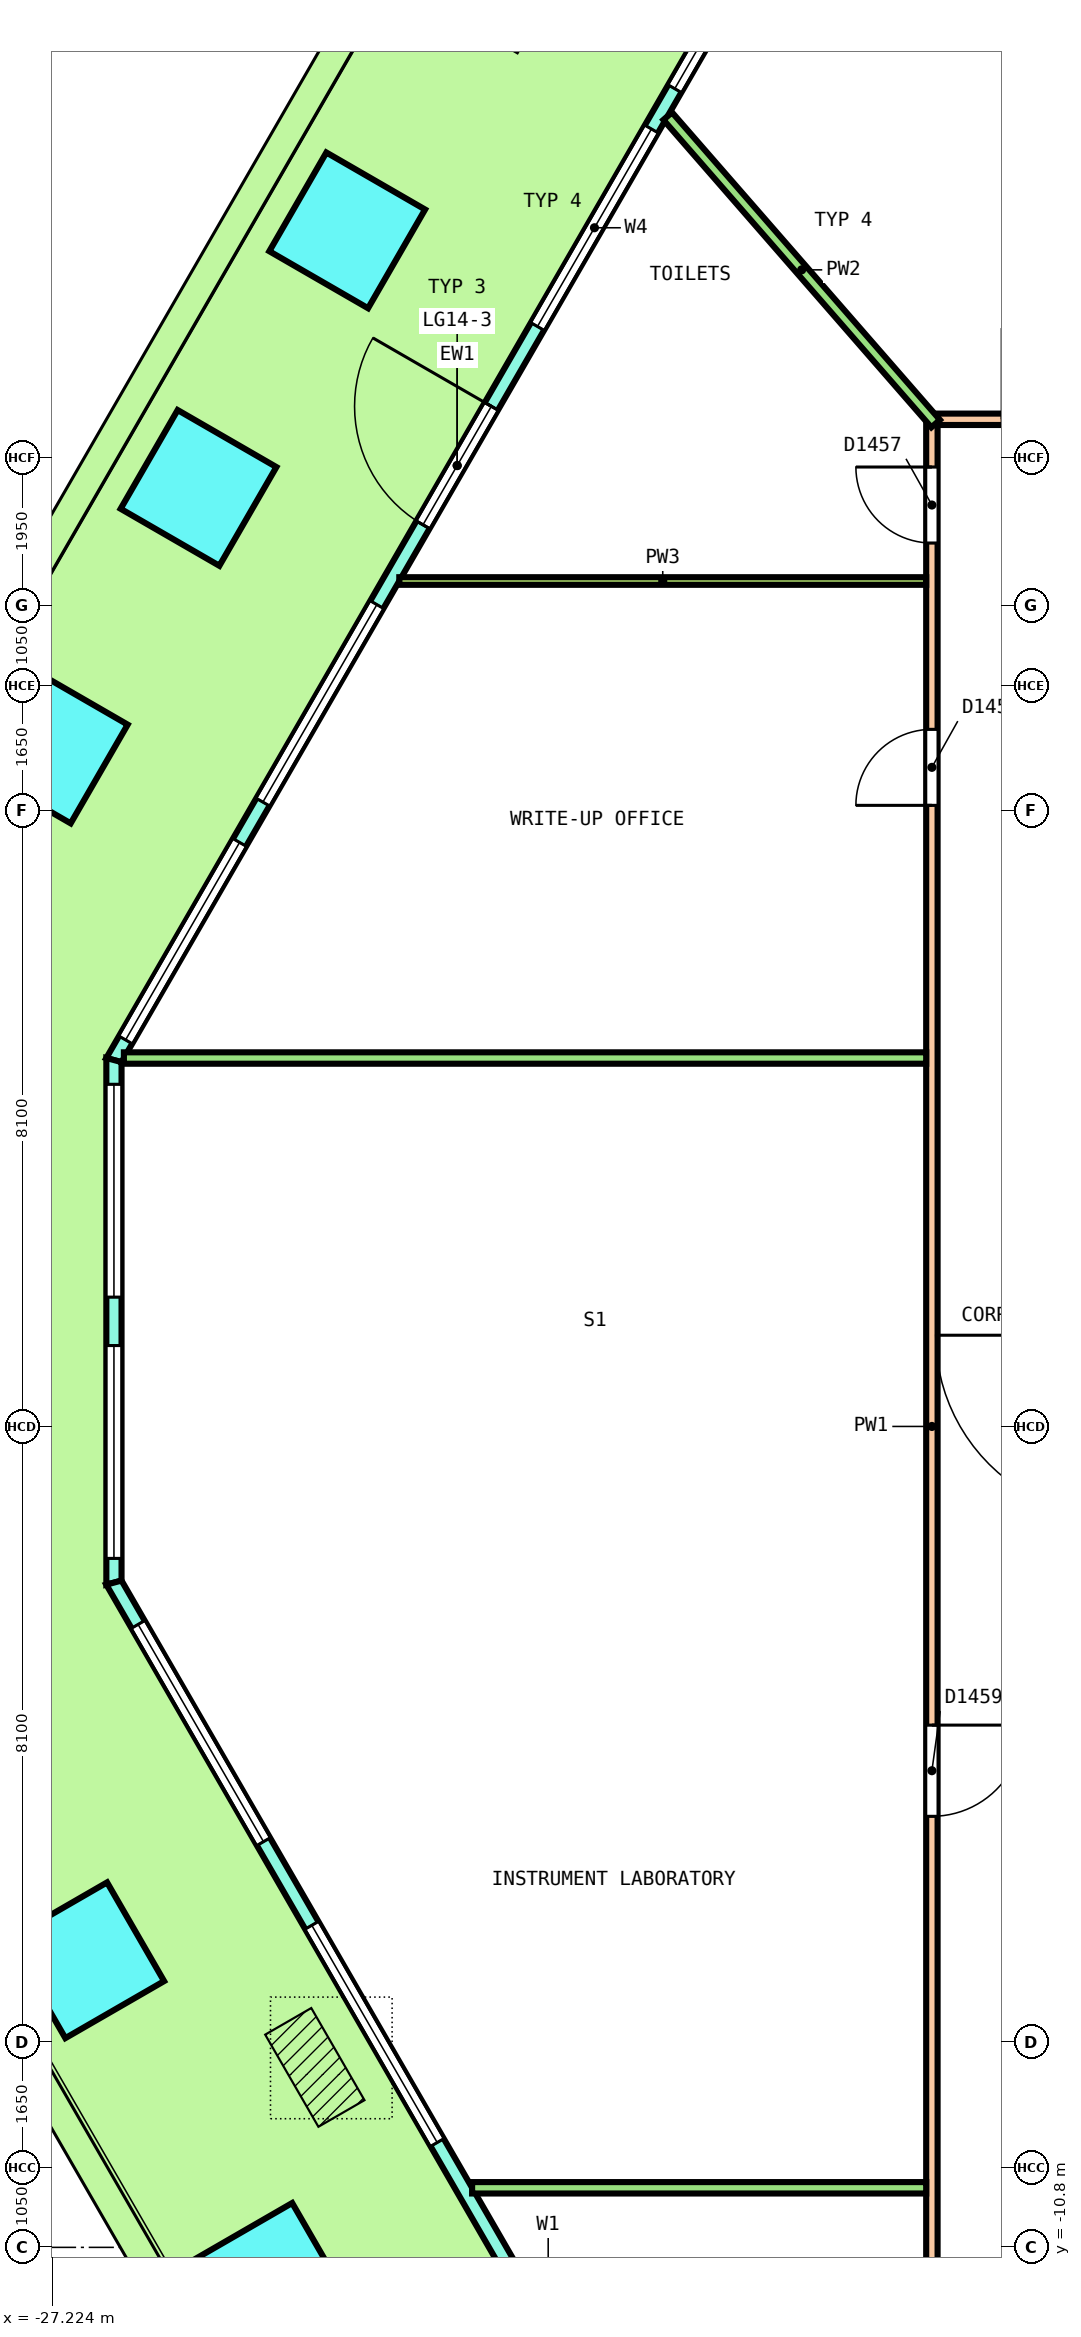
"""IFC4 building model, lengths in metres.
Left out: names, types, materials, properties, quantities, classifications, styles, units other than length and angle.
Written with IfcOpenShell. Run it as: python <this file> out.ifc"""

import sys

from ifc_helpers import new_model, si_unit, direction, frame, frame_2d, origin, origin_2d, place, context, subcontext, project, spatial, polyline, rectangle, outline, extrude, element, fill, save


model = new_model("IFC4")
c1 = context("Model", 3, precision=1e-05, world=origin(), true_north=direction((0.0, 1.0)))
c2 = subcontext(c1, "Body", "Model", "MODEL_VIEW")
j1 = project(units=[si_unit("LENGTHUNIT", "METRE"), si_unit("PLANEANGLEUNIT", "RADIAN")], contexts=[c1])
p1 = place(None, origin())
s1 = spatial("IfcSite", under=j1, at=p1, CompositionType="ELEMENT")
p2 = place(p1, origin())
s2 = spatial("IfcBuilding", under=s1, at=p2, CompositionType="ELEMENT")
p3 = place(p2, frame((0.0, 0.0, 63.0)))
s3 = spatial("IfcBuildingStorey", under=s2, at=p3, CompositionType="ELEMENT", Elevation=63.0)
for number, where, z_axis, x_axis in (
    (1, (-23.342, 15.736, 0.0), (0.0, 0.0, 1.0), (-0.5, -0.866, 0.0)),
    (2, (-25.299, 12.347, 0.0), (0.0, 0.0, 1.0), (-0.5, -0.866, 0.0)),
    (3, (-27.255, 8.959, 0.0), (0.0, 0.0, 1.0), (-0.5, -0.866, 0.0)),
    (4, (-26.776, -7.023, 0.0), (0.0, 0.0, 1.0), (0.5, -0.866, 0.0)),
):
    element("IfcColumn", number, at=place(p3, frame(where, z_axis=z_axis, x_axis=x_axis)), inside=s3, PredefinedType="COLUMN", context=c2, shape_type="SweptSolid", body=[
        extrude(rectangle(XDim=1.5, YDim=1.5, at=origin_2d()), origin(), (0.0, 0.0, 1.0), 4.04),
    ])
p4 = place(p3, frame((-24.341, -11.241, 0.0), z_axis=(0.0, 0.0, 1.0), x_axis=(0.5, -0.866025403784, 0.0)))
e5 = element("IfcColumn", 5, at=p4, inside=s3, PredefinedType="COLUMN", context=c2, shape_type="SweptSolid", body=[
    extrude(rectangle(XDim=1.5, YDim=1.5, at=origin_2d()), origin(), (0.0, 0.0, 1.0), 4.05),
])
p5 = place(p3, frame((-17.38, 20.463, 0.0), z_axis=(0.0, 0.0, 1.0), x_axis=(-0.500000137386, -0.866025324465, 0.0)))
e6 = element("IfcWall", 6, at=p5, inside=s3, PredefinedType="SOLIDWALL", context=c2, shape_type="SweptSolid", body=[
    extrude(outline(polyline([(-0.027, -0.1), (0.979, -0.1), (1.986, -0.1), (2.992, -0.1), (3.999, -0.1), (5.005, -0.1), (6.012, -0.1), (7.018, -0.1), (8.025, -0.1), (9.031, -0.1), (10.038, -0.1), (11.044, -0.1), (12.051, -0.1), (13.057, -0.1), (14.063, -0.1), (15.07, -0.1), (16.076, -0.1), (17.083, -0.1), (18.089, -0.1), (18.036, 0.1), (17.035, 0.1), (16.035, 0.1), (15.034, 0.1), (14.034, 0.1), (13.033, 0.1), (12.033, 0.1), (11.032, 0.1), (10.032, 0.1), (9.031, 0.1), (8.031, 0.1), (7.03, 0.1), (6.03, 0.1), (5.029, 0.1), (4.029, 0.1), (3.028, 0.1), (2.028, 0.1), (1.027, 0.1), (0.027, 0.1), (-0.027, -0.1)])), origin(), (0.0, 0.0, 1.0), 4.1),
])
p6 = place(p5, frame((0.306, 0.0, 0.1)))
e7 = element("IfcOpeningElement", 7, at=p6, cuts=e6, PredefinedType="OPENING", context=c2, shape_type="SweptSolid", body=[
    extrude(rectangle(XDim=3.0, YDim=2.9, at=frame_2d((1.5, 1.45))), frame((0.0, 0.11, 0.0), z_axis=(0.0, -1.0, 0.0), x_axis=(1.0, 0.0, 0.0)), (0.0, 0.0, 1.0), 0.22),
])
p7 = place(p5, frame((3.919, 0.0, 0.1)))
e8 = element("IfcOpeningElement", 8, at=p7, cuts=e6, PredefinedType="OPENING", context=c2, shape_type="SweptSolid", body=[
    extrude(rectangle(XDim=3.0, YDim=2.9, at=frame_2d((1.5, 1.45))), frame((0.0, 0.11, 0.0), z_axis=(0.0, -1.0, 0.0), x_axis=(1.0, 0.0, 0.0)), (0.0, 0.0, 1.0), 0.22),
])
p8 = place(p5, frame((8.131, 0.0, 0.0)))
e9 = element("IfcOpeningElement", 9, at=p8, cuts=e6, PredefinedType="OPENING", context=c2, shape_type="SweptSolid", body=[
    extrude(rectangle(XDim=1.8, YDim=2.4, at=frame_2d((0.9, 1.2))), frame((0.0, 0.11, 0.0), z_axis=(0.0, -1.0, 0.0), x_axis=(1.0, 0.0, 0.0)), (0.0, 0.0, 1.0), 0.22),
])
p9 = place(p5, frame((8.131, 0.0, 2.55)))
e10 = element("IfcOpeningElement", 10, at=p9, cuts=e6, PredefinedType="OPENING", context=c2, shape_type="SweptSolid", body=[
    extrude(rectangle(XDim=1.8, YDim=0.45, at=frame_2d((0.9, 0.225))), frame((0.0, 0.11, 0.0), z_axis=(0.0, -1.0, 0.0), x_axis=(1.0, 0.0, 0.0)), (0.0, 0.0, 1.0), 0.22),
])
p10 = place(p5, frame((11.144, 0.0, 0.1)))
e11 = element("IfcOpeningElement", 11, at=p10, cuts=e6, PredefinedType="OPENING", context=c2, shape_type="SweptSolid", body=[
    extrude(rectangle(XDim=3.0, YDim=2.9, at=frame_2d((1.5, 1.45))), frame((0.0, 0.11, 0.0), z_axis=(0.0, -1.0, 0.0), x_axis=(1.0, 0.0, 0.0)), (0.0, 0.0, 1.0), 0.22),
])
p11 = place(p5, frame((14.756, 0.0, 0.1)))
e12 = element("IfcOpeningElement", 12, at=p11, cuts=e6, PredefinedType="OPENING", context=c2, shape_type="SweptSolid", body=[
    extrude(rectangle(XDim=3.0, YDim=2.9, at=frame_2d((1.5, 1.45))), frame((0.0, 0.11, 0.0), z_axis=(0.0, -1.0, 0.0), x_axis=(1.0, 0.0, 0.0)), (0.0, 0.0, 1.0), 0.22),
])
p12 = place(p3, frame((-26.411, 4.82, 0.0), z_axis=(0.0, 0.0, 1.0), x_axis=(0.0, -1.0, 0.0)))
e13 = element("IfcWall", 13, at=p12, inside=s3, PredefinedType="SOLIDWALL", context=c2, shape_type="SweptSolid", body=[
    extrude(outline(polyline([(-0.027, -0.1), (1.128, -0.1), (2.283, -0.1), (3.438, -0.1), (4.592, -0.1), (5.747, -0.1), (6.902, -0.1), (6.848, 0.1), (5.711, 0.1), (4.574, 0.1), (3.438, 0.1), (2.301, 0.1), (1.164, 0.1), (0.027, 0.1), (-0.027, -0.1)])), origin(), (0.0, 0.0, 1.0), 4.1),
])
p13 = place(p12, frame((0.319, 0.0, 0.1)))
e14 = element("IfcOpeningElement", 14, at=p13, cuts=e13, PredefinedType="OPENING", context=c2, shape_type="SweptSolid", body=[
    extrude(rectangle(XDim=2.8, YDim=2.9, at=frame_2d((1.4, 1.45))), frame((0.0, 0.11, 0.0), z_axis=(0.0, -1.0, 0.0), x_axis=(1.0, 0.0, 0.0)), (0.0, 0.0, 1.0), 0.22),
])
p14 = place(p12, frame((3.756, 0.0, 0.1)))
e15 = element("IfcOpeningElement", 15, at=p14, cuts=e13, PredefinedType="OPENING", context=c2, shape_type="SweptSolid", body=[
    extrude(rectangle(XDim=2.8, YDim=2.9, at=frame_2d((1.4, 1.45))), frame((0.0, 0.11, 0.0), z_axis=(0.0, -1.0, 0.0), x_axis=(1.0, 0.0, 0.0)), (0.0, 0.0, 1.0), 0.22),
])
p15 = place(p3, frame((-26.411, -2.055, 0.0), z_axis=(0.0, 0.0, 1.0), x_axis=(0.50000204422, -0.86602422355, 0.0)))
e16 = element("IfcWall", 16, at=p15, inside=s3, PredefinedType="SOLIDWALL", context=c2, shape_type="SweptSolid", body=[
    extrude(outline(polyline([(-0.027, -0.1), (1.014, -0.1), (2.055, -0.1), (3.097, -0.1), (4.138, -0.1), (5.179, -0.1), (6.22, -0.1), (7.261, -0.1), (8.303, -0.1), (9.344, -0.1), (10.385, -0.1), (11.426, -0.1), (12.468, -0.1), (13.509, -0.1), (14.55, -0.1), (15.591, -0.1), (16.632, -0.1), (17.673, -0.1), (18.715, -0.1), (19.756, -0.1), (20.797, -0.1), (21.838, -0.1), (22.879, -0.1), (22.826, 0.1), (21.789, 0.1), (20.753, 0.1), (19.717, 0.1), (18.68, 0.1), (17.644, 0.1), (16.608, 0.1), (15.572, 0.1), (14.535, 0.1), (13.499, 0.1), (12.463, 0.1), (11.426, 0.1), (10.39, 0.1), (9.354, 0.1), (8.317, 0.1), (7.281, 0.1), (6.245, 0.1), (5.208, 0.1), (4.172, 0.1), (3.136, 0.1), (2.099, 0.1), (1.063, 0.1), (0.027, 0.1), (-0.027, -0.1)])), origin(), (0.0, 0.0, 1.0), 4.1),
])
p16 = place(p15, frame((0.635, 0.0, 0.1)))
e17 = element("IfcOpeningElement", 17, at=p16, cuts=e16, PredefinedType="OPENING", context=c2, shape_type="SweptSolid", body=[
    extrude(rectangle(XDim=3.3, YDim=2.9, at=frame_2d((1.65, 1.45))), frame((0.0, 0.11, 0.0), z_axis=(0.0, -1.0, 0.0), x_axis=(1.0, 0.0, 0.0)), (0.0, 0.0, 1.0), 0.22),
])
p17 = place(p15, frame((5.206, 0.0, 0.1)))
e18 = element("IfcOpeningElement", 18, at=p17, cuts=e16, PredefinedType="OPENING", context=c2, shape_type="SweptSolid", body=[
    extrude(rectangle(XDim=3.3, YDim=2.9, at=frame_2d((1.65, 1.45))), frame((0.0, 0.11, 0.0), z_axis=(0.0, -1.0, 0.0), x_axis=(1.0, 0.0, 0.0)), (0.0, 0.0, 1.0), 0.22),
])
p18 = place(p15, frame((10.526, 0.0, 0.0)))
e19 = element("IfcOpeningElement", 19, at=p18, cuts=e16, PredefinedType="OPENING", context=c2, shape_type="SweptSolid", body=[
    extrude(rectangle(XDim=1.8, YDim=2.4, at=frame_2d((0.9, 1.2))), frame((0.0, 0.11, 0.0), z_axis=(0.0, -1.0, 0.0), x_axis=(1.0, 0.0, 0.0)), (0.0, 0.0, 1.0), 0.22),
])
p19 = place(p15, frame((10.526, 0.0, 2.55)))
e20 = element("IfcOpeningElement", 20, at=p19, cuts=e16, PredefinedType="OPENING", context=c2, shape_type="SweptSolid", body=[
    extrude(rectangle(XDim=1.8, YDim=0.45, at=frame_2d((0.9, 0.225))), frame((0.0, 0.11, 0.0), z_axis=(0.0, -1.0, 0.0), x_axis=(1.0, 0.0, 0.0)), (0.0, 0.0, 1.0), 0.22),
])
p20 = place(p15, frame((14.347, 0.0, 0.1)))
e21 = element("IfcOpeningElement", 21, at=p20, cuts=e16, PredefinedType="OPENING", context=c2, shape_type="SweptSolid", body=[
    extrude(rectangle(XDim=3.3, YDim=2.9, at=frame_2d((1.65, 1.45))), frame((0.0, 0.11, 0.0), z_axis=(0.0, -1.0, 0.0), x_axis=(1.0, 0.0, 0.0)), (0.0, 0.0, 1.0), 0.22),
])
p21 = place(p15, frame((18.917, 0.0, 0.1)))
e22 = element("IfcOpeningElement", 22, at=p21, cuts=e16, PredefinedType="OPENING", context=c2, shape_type="SweptSolid", body=[
    extrude(rectangle(XDim=3.3, YDim=2.9, at=frame_2d((1.65, 1.45))), frame((0.0, 0.11, 0.0), z_axis=(0.0, -1.0, 0.0), x_axis=(1.0, 0.0, 0.0)), (0.0, 0.0, 1.0), 0.22),
])
p22 = place(p3, frame((-15.575, 13.25, 0.0), z_axis=(0.0, 0.0, 1.0), x_axis=(1.0, 0.0, 0.0)))
e23 = element("IfcWall", 23, at=p22, inside=s3, PredefinedType="PARTITIONING", context=c2, shape_type="SweptSolid", body=[
    extrude(rectangle(XDim=31.175, YDim=0.15, at=frame_2d((15.587, 0.0))), origin(), (0.0, 0.0, 1.0), 3.05),
])
p23 = place(p22, frame((28.252, 0.0, 0.0)))
e24 = element("IfcOpeningElement", 24, at=p23, cuts=e23, PredefinedType="OPENING", context=c2, shape_type="SweptSolid", body=[
    extrude(rectangle(XDim=1.0, YDim=2.1, at=frame_2d((0.5, 1.05))), frame((0.0, 0.085, 0.0), z_axis=(0.0, -1.0, 0.0), x_axis=(1.0, 0.0, 0.0)), (0.0, 0.0, 1.0), 0.17),
])
p24 = place(p22, frame((14.802, 0.0, 0.0)))
e25 = element("IfcOpeningElement", 25, at=p24, cuts=e23, PredefinedType="OPENING", context=c2, shape_type="SweptSolid", body=[
    extrude(rectangle(XDim=1.2, YDim=2.1, at=frame_2d((0.6, 1.05))), frame((0.0, 0.085, 0.0), z_axis=(0.0, -1.0, 0.0), x_axis=(1.0, 0.0, 0.0)), (0.0, 0.0, 1.0), 0.17),
])
p25 = place(p22, frame((5.812, 0.0, 0.0)))
e26 = element("IfcOpeningElement", 26, at=p25, cuts=e23, PredefinedType="OPENING", context=c2, shape_type="SweptSolid", body=[
    extrude(rectangle(XDim=1.2, YDim=2.1, at=frame_2d((0.6, 1.05))), frame((0.0, 0.085, 0.0), z_axis=(0.0, -1.0, 0.0), x_axis=(1.0, 0.0, 0.0)), (0.0, 0.0, 1.0), 0.17),
])
p26 = place(p22, frame((0.849, 0.0, 0.0)))
e27 = element("IfcOpeningElement", 27, at=p26, cuts=e23, PredefinedType="OPENING", context=c2, shape_type="SweptSolid", body=[
    extrude(rectangle(XDim=1.2, YDim=2.1, at=frame_2d((0.6, 1.05))), frame((0.0, 0.085, 0.0), z_axis=(0.0, -1.0, 0.0), x_axis=(1.0, 0.0, 0.0)), (0.0, 0.0, 1.0), 0.17),
])
p27 = place(p3, frame((-15.65, -13.175, 0.0), z_axis=(0.0, 0.0, 1.0), x_axis=(0.0, 1.0, 0.0)))
e28 = element("IfcWall", 28, at=p27, inside=s3, PredefinedType="PARTITIONING", context=c2, shape_type="SweptSolid", body=[
    extrude(rectangle(XDim=26.35, YDim=0.15, at=frame_2d((13.175, 0.0))), origin(), (0.0, 0.0, 1.0), 3.05),
])
p28 = place(p27, frame((24.797, 0.0, 0.0)))
e29 = element("IfcOpeningElement", 29, at=p28, cuts=e28, PredefinedType="OPENING", context=c2, shape_type="SweptSolid", body=[
    extrude(rectangle(XDim=1.0, YDim=2.1, at=frame_2d((0.5, 1.05))), frame((0.0, 0.085, 0.0), z_axis=(0.0, -1.0, 0.0), x_axis=(1.0, 0.0, 0.0)), (0.0, 0.0, 1.0), 0.17),
])
p29 = place(p27, frame((21.346, 0.0, 0.0)))
e30 = element("IfcOpeningElement", 30, at=p29, cuts=e28, PredefinedType="OPENING", context=c2, shape_type="SweptSolid", body=[
    extrude(rectangle(XDim=1.0, YDim=2.1, at=frame_2d((0.5, 1.05))), frame((0.0, 0.085, 0.0), z_axis=(0.0, -1.0, 0.0), x_axis=(1.0, 0.0, 0.0)), (0.0, 0.0, 1.0), 0.17),
])
p30 = place(p27, frame((8.046, 0.0, 0.0)))
e31 = element("IfcOpeningElement", 31, at=p30, cuts=e28, PredefinedType="OPENING", context=c2, shape_type="SweptSolid", body=[
    extrude(rectangle(XDim=1.2, YDim=2.1, at=frame_2d((0.6, 1.05))), frame((0.0, 0.085, 0.0), z_axis=(0.0, -1.0, 0.0), x_axis=(1.0, 0.0, 0.0)), (0.0, 0.0, 1.0), 0.17),
])
p31 = place(p3, frame((-19.126, 17.239, 0.0), z_axis=(0.0, 0.0, 1.0), x_axis=(0.65698603945, -0.753902741717, 0.0)))
e32 = element("IfcWall", 32, at=p31, inside=s3, PredefinedType="PARTITIONING", context=c2, shape_type="SweptSolid", body=[
    extrude(rectangle(XDim=5.366, YDim=0.15, at=frame_2d((2.683, 0.0))), origin(), (0.0, 0.0, 1.0), 3.05),
])
p32 = place(p3, frame((-26.28, 4.847, 0.0), z_axis=(0.0, 0.0, 1.0), x_axis=(1.0, 0.0, 0.0)))
e33 = element("IfcWall", 33, at=p32, inside=s3, PredefinedType="PARTITIONING", context=c2, shape_type="SweptSolid", body=[
    extrude(rectangle(XDim=10.555, YDim=0.15, at=frame_2d((5.278, 0.0))), origin(), (0.0, 0.0, 1.0), 3.05),
])
p33 = place(p3, frame((-21.699, -10.016, 0.0), z_axis=(0.0, 0.0, 1.0), x_axis=(1.0, 0.0, 0.0)))
e34 = element("IfcWall", 34, at=p33, inside=s3, PredefinedType="PARTITIONING", context=c2, shape_type="SweptSolid", body=[
    extrude(rectangle(XDim=5.974, YDim=0.15, at=frame_2d((2.987, 0.0))), origin(), (0.0, 0.0, 1.0), 3.05),
])
p34 = place(p3, frame((-22.657, 11.123, 0.0), z_axis=(0.0, 0.0, 1.0), x_axis=(1.0, 0.0, 0.0)))
e35 = element("IfcWall", 35, at=p34, inside=s3, PredefinedType="PARTITIONING", context=c2, shape_type="SweptSolid", body=[
    extrude(rectangle(XDim=6.932, YDim=0.1, at=frame_2d((3.466, 0.0))), origin(), (0.0, 0.0, 1.0), 3.05),
])
p35 = place(p6, origin())
e36 = element("IfcWindow", 36, at=p35, inside=s3, PartitioningType="SINGLE_PANEL", PredefinedType="WINDOW", context=c2, shape_type="SweptSolid", body=[
    extrude(rectangle(XDim=3.0, YDim=2.9, at=frame_2d((1.5, 1.45))), frame((0.0, 0.03, 0.0), z_axis=(0.0, -1.0, 0.0), x_axis=(1.0, 0.0, 0.0)), (0.0, 0.0, 1.0), 0.06),
])
fill(e7, e36)
p36 = place(p7, origin())
e37 = element("IfcWindow", 37, at=p36, inside=s3, PartitioningType="SINGLE_PANEL", PredefinedType="WINDOW", context=c2, shape_type="SweptSolid", body=[
    extrude(rectangle(XDim=3.0, YDim=2.9, at=frame_2d((1.5, 1.45))), frame((0.0, 0.03, 0.0), z_axis=(0.0, -1.0, 0.0), x_axis=(1.0, 0.0, 0.0)), (0.0, 0.0, 1.0), 0.06),
])
fill(e8, e37)
p37 = place(p8, origin())
e38 = element("IfcDoor", 38, at=p37, inside=s3, OperationType="DOUBLE_DOOR_SINGLE_SWING", PredefinedType="DOOR", context=c2, shape_type="SweptSolid", body=[
    extrude(rectangle(XDim=1.8, YDim=2.4, at=frame_2d((0.9, 1.2))), frame((0.0, 0.025, 0.0), z_axis=(0.0, -1.0, 0.0), x_axis=(1.0, 0.0, 0.0)), (0.0, 0.0, 1.0), 0.05),
])
fill(e9, e38)
p38 = place(p9, origin())
e39 = element("IfcWindow", 39, at=p38, inside=s3, PartitioningType="SINGLE_PANEL", PredefinedType="WINDOW", context=c2, shape_type="SweptSolid", body=[
    extrude(rectangle(XDim=1.8, YDim=0.45, at=frame_2d((0.9, 0.225))), frame((0.0, 0.03, 0.0), z_axis=(0.0, -1.0, 0.0), x_axis=(1.0, 0.0, 0.0)), (0.0, 0.0, 1.0), 0.06),
])
fill(e10, e39)
p39 = place(p10, origin())
e40 = element("IfcWindow", 40, at=p39, inside=s3, PartitioningType="SINGLE_PANEL", PredefinedType="WINDOW", context=c2, shape_type="SweptSolid", body=[
    extrude(rectangle(XDim=3.0, YDim=2.9, at=frame_2d((1.5, 1.45))), frame((0.0, 0.03, 0.0), z_axis=(0.0, -1.0, 0.0), x_axis=(1.0, 0.0, 0.0)), (0.0, 0.0, 1.0), 0.06),
])
fill(e11, e40)
p40 = place(p11, origin())
e41 = element("IfcWindow", 41, at=p40, inside=s3, PartitioningType="SINGLE_PANEL", PredefinedType="WINDOW", context=c2, shape_type="SweptSolid", body=[
    extrude(rectangle(XDim=3.0, YDim=2.9, at=frame_2d((1.5, 1.45))), frame((0.0, 0.03, 0.0), z_axis=(0.0, -1.0, 0.0), x_axis=(1.0, 0.0, 0.0)), (0.0, 0.0, 1.0), 0.06),
])
fill(e12, e41)
p41 = place(p13, origin())
e42 = element("IfcWindow", 42, at=p41, inside=s3, PartitioningType="SINGLE_PANEL", PredefinedType="WINDOW", context=c2, shape_type="SweptSolid", body=[
    extrude(rectangle(XDim=2.8, YDim=2.9, at=frame_2d((1.4, 1.45))), frame((0.0, 0.03, 0.0), z_axis=(0.0, -1.0, 0.0), x_axis=(1.0, 0.0, 0.0)), (0.0, 0.0, 1.0), 0.06),
])
fill(e14, e42)
p42 = place(p14, origin())
e43 = element("IfcWindow", 43, at=p42, inside=s3, PartitioningType="SINGLE_PANEL", PredefinedType="WINDOW", context=c2, shape_type="SweptSolid", body=[
    extrude(rectangle(XDim=2.8, YDim=2.9, at=frame_2d((1.4, 1.45))), frame((0.0, 0.03, 0.0), z_axis=(0.0, -1.0, 0.0), x_axis=(1.0, 0.0, 0.0)), (0.0, 0.0, 1.0), 0.06),
])
fill(e15, e43)
p43 = place(p16, origin())
e44 = element("IfcWindow", 44, at=p43, inside=s3, PartitioningType="SINGLE_PANEL", PredefinedType="WINDOW", context=c2, shape_type="SweptSolid", body=[
    extrude(rectangle(XDim=3.3, YDim=2.9, at=frame_2d((1.65, 1.45))), frame((0.0, 0.03, 0.0), z_axis=(0.0, -1.0, 0.0), x_axis=(1.0, 0.0, 0.0)), (0.0, 0.0, 1.0), 0.06),
])
fill(e17, e44)
p44 = place(p17, origin())
e45 = element("IfcWindow", 45, at=p44, inside=s3, PartitioningType="SINGLE_PANEL", PredefinedType="WINDOW", context=c2, shape_type="SweptSolid", body=[
    extrude(rectangle(XDim=3.3, YDim=2.9, at=frame_2d((1.65, 1.45))), frame((0.0, 0.03, 0.0), z_axis=(0.0, -1.0, 0.0), x_axis=(1.0, 0.0, 0.0)), (0.0, 0.0, 1.0), 0.06),
])
fill(e18, e45)
p45 = place(p28, origin())
e46 = element("IfcDoor", 46, at=p45, inside=s3, OperationType="SINGLE_SWING_RIGHT", PredefinedType="DOOR", context=c2, shape_type="SweptSolid", body=[
    extrude(rectangle(XDim=1.0, YDim=2.1, at=frame_2d((0.5, 1.05))), frame((0.0, 0.025, 0.0), z_axis=(0.0, -1.0, 0.0), x_axis=(1.0, 0.0, 0.0)), (0.0, 0.0, 1.0), 0.05),
])
fill(e29, e46)
p46 = place(p29, origin())
e47 = element("IfcDoor", 47, at=p46, inside=s3, OperationType="SINGLE_SWING_LEFT", PredefinedType="DOOR", context=c2, shape_type="SweptSolid", body=[
    extrude(rectangle(XDim=1.0, YDim=2.1, at=frame_2d((0.5, 1.05))), frame((0.0, 0.025, 0.0), z_axis=(0.0, -1.0, 0.0), x_axis=(1.0, 0.0, 0.0)), (0.0, 0.0, 1.0), 0.05),
])
fill(e30, e47)
p47 = place(p30, origin())
e48 = element("IfcDoor", 48, at=p47, inside=s3, OperationType="DOUBLE_DOOR_SINGLE_SWING", PredefinedType="DOOR", context=c2, shape_type="SweptSolid", body=[
    extrude(rectangle(XDim=1.2, YDim=2.1, at=frame_2d((0.6, 1.05))), frame((0.0, 0.025, 0.0), z_axis=(0.0, -1.0, 0.0), x_axis=(1.0, 0.0, 0.0)), (0.0, 0.0, 1.0), 0.05),
])
fill(e31, e48)
save(model, sys.argv[1])
